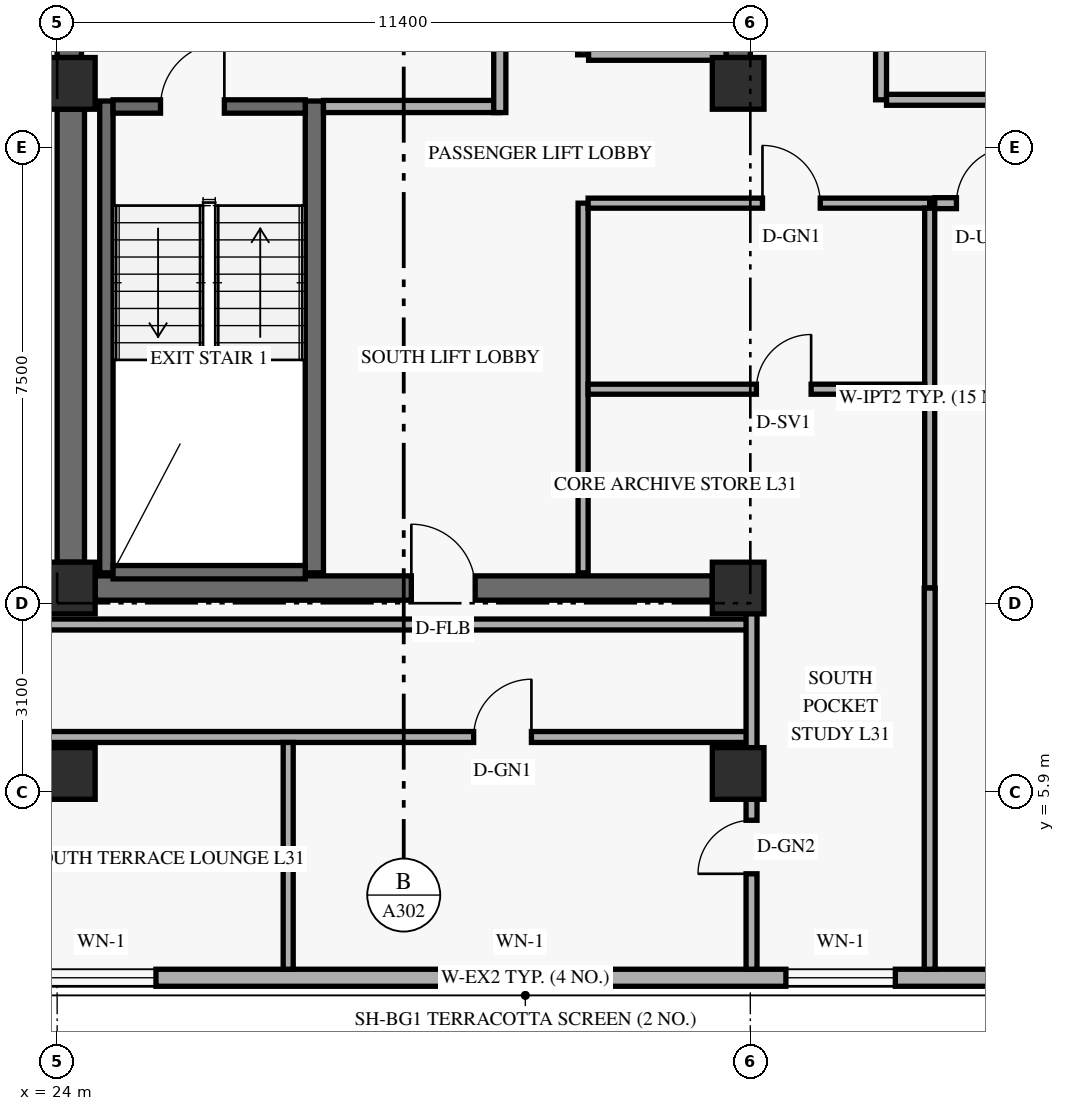
"""IFC4 building model, lengths in metres.
Left out: names, types, materials, properties, quantities, classifications, styles, units other than length and angle.
Written with IfcOpenShell. Run it as: python <this file> out.ifc"""

import sys

from ifc_helpers import new_model, si_unit, direction, frame, frame_2d, origin, origin_2d, place, context, subcontext, project, spatial, rectangle, extrude, element, fill, save


model = new_model("IFC4")
c1 = context("Model", 3, precision=1e-05, world=origin(), true_north=direction((0.0, 1.0)))
c2 = subcontext(c1, "Body", "Model", "MODEL_VIEW")
j1 = project(units=[si_unit("LENGTHUNIT", "METRE"), si_unit("PLANEANGLEUNIT", "RADIAN")], contexts=[c1])
p1 = place(None, origin())
s1 = spatial("IfcSite", under=j1, at=p1, CompositionType="ELEMENT")
p2 = place(p1, origin())
s2 = spatial("IfcBuilding", under=s1, at=p2, CompositionType="ELEMENT")
p3 = place(p2, frame((0.0, 0.0, 121.2)))
s3 = spatial("IfcBuildingStorey", under=s2, at=p3, CompositionType="ELEMENT", Elevation=121.2)
p4 = place(p3, frame((24.225, 9.675, 0.0), z_axis=(0.0, 0.0, 1.0), x_axis=(0.0, 1.0, 0.0)))
e1 = element("IfcWall", 1, at=p4, inside=s3, PredefinedType="SHEAR", context=c2, shape_type="SweptSolid", body=[
    extrude(rectangle(XDim=7.45, YDim=0.45, at=frame_2d((3.725, 0.0))), origin(), (0.0, 0.0, 1.0), 2.749),
])
p5 = place(p3, frame((24.2, 17.975, 0.0), z_axis=(0.0, 0.0, 1.0), x_axis=(0.0, 1.0, 0.0)))
e2 = element("IfcWall", 2, at=p5, inside=s3, PredefinedType="SHEAR", context=c2, shape_type="SweptSolid", body=[
    extrude(rectangle(XDim=11.8, YDim=0.4, at=frame_2d((5.9, 0.0))), origin(), (0.0, 0.0, 1.0), 2.749),
])
p6 = place(p3, frame((35.2, 17.975, 0.0), z_axis=(0.0, 0.0, 1.0), x_axis=(0.0, 1.0, 0.0)))
e3 = element("IfcWall", 3, at=p6, inside=s3, PredefinedType="SHEAR", context=c2, shape_type="SweptSolid", body=[
    extrude(rectangle(XDim=10.125, YDim=0.4, at=frame_2d((5.062, 0.0))), origin(), (0.0, 0.0, 1.0), 2.749),
])
p7 = place(p3, frame((24.625, 9.25, 0.0), z_axis=(0.0, 0.0, 1.0), x_axis=(1.0, 0.0, 0.0)))
e4 = element("IfcWall", 4, at=p7, inside=s3, PredefinedType="SHEAR", context=c2, shape_type="SweptSolid", body=[
    extrude(rectangle(XDim=10.15, YDim=0.4, at=frame_2d((5.075, 0.0))), origin(), (0.0, 0.0, 1.0), 3.36),
])
p8 = place(p7, frame((5.2, 0.0, 0.0)))
e5 = element("IfcOpeningElement", 5, at=p8, cuts=e4, PredefinedType="OPENING", context=c2, shape_type="SweptSolid", body=[
    extrude(rectangle(XDim=1.05, YDim=2.15, at=frame_2d((0.525, 1.075))), frame((0.0, 0.21, 0.0), z_axis=(0.0, -1.0, 0.0), x_axis=(1.0, 0.0, 0.0)), (0.0, 0.0, 1.0), 0.42),
])
p9 = place(p3, frame((24.81, 9.5, 0.0), z_axis=(0.0, 0.0, 1.0), x_axis=(0.0, 1.0, 0.0)))
e6 = element("IfcWall", 6, at=p9, inside=s3, PredefinedType="SHEAR", context=c2, shape_type="SweptSolid", body=[
    extrude(rectangle(XDim=7.76, YDim=0.22, at=frame_2d((3.88, 0.0))), origin(), (0.0, 0.0, 1.0), 3.36),
])
p10 = place(p3, frame((28.23, 9.5, 0.0), z_axis=(0.0, 0.0, 1.0), x_axis=(0.0, 1.0, 0.0)))
e7 = element("IfcWall", 7, at=p10, inside=s3, PredefinedType="SHEAR", context=c2, shape_type="SweptSolid", body=[
    extrude(rectangle(XDim=7.76, YDim=0.3, at=frame_2d((3.88, 0.0))), origin(), (0.0, 0.0, 1.0), 3.36),
])
p11 = place(p3, frame((24.92, 9.51, 0.0), z_axis=(0.0, 0.0, 1.0), x_axis=(1.0, 0.0, 0.0)))
e8 = element("IfcWall", 8, at=p11, inside=s3, PredefinedType="SHEAR", context=c2, shape_type="SweptSolid", body=[
    extrude(rectangle(XDim=3.16, YDim=0.22, at=frame_2d((1.58, 0.0))), origin(), (0.0, 0.0, 1.0), 3.36),
])
p12 = place(p3, frame((24.92, 17.17, 0.0), z_axis=(0.0, 0.0, 1.0), x_axis=(1.0, 0.0, 0.0)))
e9 = element("IfcWall", 9, at=p12, inside=s3, PredefinedType="SHEAR", context=c2, shape_type="SweptSolid", body=[
    extrude(rectangle(XDim=3.16, YDim=0.22, at=frame_2d((1.58, 0.0))), origin(), (0.0, 0.0, 1.0), 3.36),
])
p13 = place(p12, frame((0.78, 0.0, 0.0)))
e10 = element("IfcOpeningElement", 10, at=p13, cuts=e9, PredefinedType="OPENING", context=c2, shape_type="SweptSolid", body=[
    extrude(rectangle(XDim=1.05, YDim=2.15, at=frame_2d((0.525, 1.075))), frame((0.0, 0.12, 0.0), z_axis=(0.0, -1.0, 0.0), x_axis=(1.0, 0.0, 0.0)), (0.0, 0.0, 1.0), 0.24),
])
for number, where, z_axis, x_axis in (
    (11, (24.2, 6.2, 0.0), (0.0, 0.0, 1.0), (1.0, 0.0, 0.0)),
    (12, (24.2, 9.25, 0.0), (0.0, 0.0, 1.0), (1.0, 0.0, 0.0)),
    (13, (24.2, 17.55, 0.0), (0.0, 0.0, 1.0), (1.0, 0.0, 0.0)),
    (14, (35.2, 6.2, 0.0), (0.0, 0.0, 1.0), (1.0, 0.0, 0.0)),
    (15, (35.2, 9.25, 0.0), (0.0, 0.0, 1.0), (1.0, 0.0, 0.0)),
    (16, (35.2, 17.55, 0.0), (0.0, 0.0, 1.0), (1.0, 0.0, 0.0)),
):
    element("IfcColumn", number, at=place(p3, frame(where, z_axis=z_axis, x_axis=x_axis)), inside=s3, PredefinedType="COLUMN", context=c2, shape_type="SweptSolid", body=[
        extrude(rectangle(XDim=0.85, YDim=0.85, at=origin_2d()), origin(), (0.0, 0.0, 1.0), 3.6),
    ])
p14 = place(p3, frame((13.42, 2.84, 0.0), z_axis=(0.0, 0.0, 1.0), x_axis=(1.0, 0.0, 0.0)))
e17 = element("IfcWall", 17, at=p14, inside=s3, PredefinedType="SOLIDWALL", context=c2, shape_type="SweptSolid", body=[
    extrude(rectangle(XDim=36.56, YDim=0.28, at=frame_2d((18.28, 0.0))), origin(), (0.0, 0.0, 1.0), 3.36),
])
p15 = place(p14, frame((3.215, 0.0, 0.85)))
e18 = element("IfcOpeningElement", 18, at=p15, cuts=e17, PredefinedType="OPENING", context=c2, shape_type="SweptSolid", body=[
    extrude(rectangle(XDim=1.8, YDim=1.6, at=frame_2d((0.9, 0.8))), frame((0.0, 0.15, 0.0), z_axis=(0.0, -1.0, 0.0), x_axis=(1.0, 0.0, 0.0)), (0.0, 0.0, 1.0), 0.3),
])
p16 = place(p14, frame((10.405, 0.0, 0.85)))
e19 = element("IfcOpeningElement", 19, at=p16, cuts=e17, PredefinedType="OPENING", context=c2, shape_type="SweptSolid", body=[
    extrude(rectangle(XDim=1.8, YDim=1.6, at=frame_2d((0.9, 0.8))), frame((0.0, 0.15, 0.0), z_axis=(0.0, -1.0, 0.0), x_axis=(1.0, 0.0, 0.0)), (0.0, 0.0, 1.0), 0.3),
])
p17 = place(p14, frame((17.29, 0.0, 0.85)))
e20 = element("IfcOpeningElement", 20, at=p17, cuts=e17, PredefinedType="OPENING", context=c2, shape_type="SweptSolid", body=[
    extrude(rectangle(XDim=1.8, YDim=1.6, at=frame_2d((0.9, 0.8))), frame((0.0, 0.15, 0.0), z_axis=(0.0, -1.0, 0.0), x_axis=(1.0, 0.0, 0.0)), (0.0, 0.0, 1.0), 0.3),
])
p18 = place(p14, frame((22.565, 0.0, 0.85)))
e21 = element("IfcOpeningElement", 21, at=p18, cuts=e17, PredefinedType="OPENING", context=c2, shape_type="SweptSolid", body=[
    extrude(rectangle(XDim=1.8, YDim=1.6, at=frame_2d((0.9, 0.8))), frame((0.0, 0.15, 0.0), z_axis=(0.0, -1.0, 0.0), x_axis=(1.0, 0.0, 0.0)), (0.0, 0.0, 1.0), 0.3),
])
p19 = place(p14, frame((28.355, 0.0, 0.85)))
e22 = element("IfcOpeningElement", 22, at=p19, cuts=e17, PredefinedType="OPENING", context=c2, shape_type="SweptSolid", body=[
    extrude(rectangle(XDim=1.8, YDim=1.6, at=frame_2d((0.9, 0.8))), frame((0.0, 0.15, 0.0), z_axis=(0.0, -1.0, 0.0), x_axis=(1.0, 0.0, 0.0)), (0.0, 0.0, 1.0), 0.3),
])
p20 = place(p14, frame((34.17, 0.0, 0.85)))
e23 = element("IfcOpeningElement", 23, at=p20, cuts=e17, PredefinedType="OPENING", context=c2, shape_type="SweptSolid", body=[
    extrude(rectangle(XDim=1.8, YDim=1.6, at=frame_2d((0.9, 0.8))), frame((0.0, 0.15, 0.0), z_axis=(0.0, -1.0, 0.0), x_axis=(1.0, 0.0, 0.0)), (0.0, 0.0, 1.0), 0.3),
])
p21 = place(p3, frame((28.38, 17.17, 0.0), z_axis=(0.0, 0.0, 1.0), x_axis=(1.0, 0.0, 0.0)))
e24 = element("IfcWall", 24, at=p21, inside=s3, PredefinedType="STANDARD", context=c2, shape_type="SweptSolid", body=[
    extrude(rectangle(XDim=2.9, YDim=0.2, at=frame_2d((1.45, 0.0))), origin(), (0.0, 0.0, 1.0), 3.36),
])
p22 = place(p3, frame((31.28, 17.07, 0.0), z_axis=(0.0, 0.0, 1.0), x_axis=(0.0, 1.0, 0.0)))
e25 = element("IfcWall", 25, at=p22, inside=s3, PredefinedType="STANDARD", context=c2, shape_type="SweptSolid", body=[
    extrude(rectangle(XDim=3.92, YDim=0.2, at=frame_2d((1.96, 0.0))), origin(), (0.0, 0.0, 1.0), 2.731),
])
p23 = place(p22, frame((1.35, 0.0, 0.0)))
e26 = element("IfcOpeningElement", 26, at=p23, cuts=e25, PredefinedType="OPENING", context=c2, shape_type="SweptSolid", body=[
    extrude(rectangle(XDim=1.2, YDim=2.15, at=frame_2d((0.6, 1.075))), frame((0.0, 0.11, 0.0), z_axis=(0.0, -1.0, 0.0), x_axis=(1.0, 0.0, 0.0)), (0.0, 0.0, 1.0), 0.22),
])
p24 = place(p3, frame((32.65, 18.02, 0.0), z_axis=(0.0, 0.0, 1.0), x_axis=(0.0, 1.0, 0.0)))
e27 = element("IfcWall", 27, at=p24, inside=s3, PredefinedType="STANDARD", context=c2, shape_type="SweptSolid", body=[
    extrude(rectangle(XDim=10.06, YDim=0.18, at=frame_2d((5.03, 0.0))), origin(), (0.0, 0.0, 1.0), 3.36),
])
p25 = place(p3, frame((32.74, 18.02, 0.0), z_axis=(0.0, 0.0, 1.0), x_axis=(1.0, 0.0, 0.0)))
e28 = element("IfcWall", 28, at=p25, inside=s3, PredefinedType="STANDARD", context=c2, shape_type="SweptSolid", body=[
    extrude(rectangle(XDim=2.26, YDim=0.18, at=frame_2d((1.13, 0.0))), origin(), (0.0, 0.0, 1.0), 3.36),
])
p26 = place(p3, frame((32.65, 9.5, 0.0), z_axis=(0.0, 0.0, 1.0), x_axis=(0.0, 1.0, 0.0)))
e29 = element("IfcWall", 29, at=p26, inside=s3, PredefinedType="PARTITIONING", context=c2, shape_type="SweptSolid", body=[
    extrude(rectangle(XDim=6.08, YDim=0.165, at=frame_2d((3.04, 0.0))), origin(), (0.0, 0.0, 1.0), 3.36),
])
p27 = place(p3, frame((32.732, 15.58, 0.0), z_axis=(0.0, 0.0, 1.0), x_axis=(1.0, 0.0, 0.0)))
e30 = element("IfcWall", 30, at=p27, inside=s3, PredefinedType="PARTITIONING", context=c2, shape_type="SweptSolid", body=[
    extrude(rectangle(XDim=5.618, YDim=0.165, at=frame_2d((2.809, 0.0))), origin(), (0.0, 0.0, 1.0), 2.731),
])
p28 = place(p27, frame((2.867, 0.0, 0.0)))
e31 = element("IfcOpeningElement", 31, at=p28, cuts=e30, PredefinedType="OPENING", context=c2, shape_type="SweptSolid", body=[
    extrude(rectangle(XDim=0.95, YDim=2.15, at=frame_2d((0.475, 1.075))), frame((0.0, 0.093, 0.0), z_axis=(0.0, -1.0, 0.0), x_axis=(1.0, 0.0, 0.0)), (0.0, 0.0, 1.0), 0.185),
])
p29 = place(p3, frame((38.35, 9.25, 0.0), z_axis=(0.0, 0.0, 1.0), x_axis=(0.0, 1.0, 0.0)))
e32 = element("IfcWall", 32, at=p29, inside=s3, PredefinedType="PARTITIONING", context=c2, shape_type="SweptSolid", body=[
    extrude(rectangle(XDim=6.248, YDim=0.165, at=frame_2d((3.124, 0.0))), origin(), (0.0, 0.0, 1.0), 2.731),
])
p30 = place(p3, frame((32.732, 12.52, 0.0), z_axis=(0.0, 0.0, 1.0), x_axis=(1.0, 0.0, 0.0)))
e33 = element("IfcWall", 33, at=p30, inside=s3, PredefinedType="PARTITIONING", context=c2, shape_type="SweptSolid", body=[
    extrude(rectangle(XDim=5.535, YDim=0.165, at=frame_2d((2.768, 0.0))), origin(), (0.0, 0.0, 1.0), 2.731),
])
p31 = place(p30, frame((2.768, 0.0, 0.0)))
e34 = element("IfcOpeningElement", 34, at=p31, cuts=e33, PredefinedType="OPENING", context=c2, shape_type="SweptSolid", body=[
    extrude(rectangle(XDim=0.9, YDim=2.1, at=frame_2d((0.45, 1.05))), frame((0.0, 0.093, 0.0), z_axis=(0.0, -1.0, 0.0), x_axis=(1.0, 0.0, 0.0)), (0.0, 0.0, 1.0), 0.185),
])
p32 = place(p3, frame((37.55, 17.28, 0.0), z_axis=(0.0, 0.0, 1.0), x_axis=(0.0, 1.0, 0.0)))
e35 = element("IfcWall", 35, at=p32, inside=s3, PredefinedType="STANDARD", context=c2, shape_type="SweptSolid", body=[
    extrude(rectangle(XDim=10.28, YDim=0.18, at=frame_2d((5.14, 0.0))), origin(), (0.0, 0.0, 1.0), 2.731),
])
p33 = place(p32, frame((1.94, 0.0, 0.0)))
e36 = element("IfcOpeningElement", 36, at=p33, cuts=e35, PredefinedType="OPENING", context=c2, shape_type="SweptSolid", body=[
    extrude(rectangle(XDim=0.95, YDim=2.15, at=frame_2d((0.475, 1.075))), frame((0.0, 0.1, 0.0), z_axis=(0.0, -1.0, 0.0), x_axis=(1.0, 0.0, 0.0)), (0.0, 0.0, 1.0), 0.2),
])
p34 = place(p32, frame((6.99, 0.0, 0.0)))
e37 = element("IfcOpeningElement", 37, at=p34, cuts=e35, PredefinedType="OPENING", context=c2, shape_type="SweptSolid", body=[
    extrude(rectangle(XDim=0.95, YDim=2.15, at=frame_2d((0.475, 1.075))), frame((0.0, 0.1, 0.0), z_axis=(0.0, -1.0, 0.0), x_axis=(1.0, 0.0, 0.0)), (0.0, 0.0, 1.0), 0.2),
])
p35 = place(p3, frame((38.433, 15.58, 0.0), z_axis=(0.0, 0.0, 1.0), x_axis=(1.0, 0.0, 0.0)))
e38 = element("IfcWall", 38, at=p35, inside=s3, PredefinedType="STANDARD", context=c2, shape_type="SweptSolid", body=[
    extrude(rectangle(XDim=8.567, YDim=0.18, at=frame_2d((4.284, 0.0))), origin(), (0.0, 0.0, 1.0), 2.731),
])
p36 = place(p35, frame((0.357, 0.0, 0.0)))
e39 = element("IfcOpeningElement", 39, at=p36, cuts=e38, PredefinedType="OPENING", context=c2, shape_type="SweptSolid", body=[
    extrude(rectangle(XDim=0.92, YDim=2.15, at=frame_2d((0.46, 1.075))), frame((0.0, 0.1, 0.0), z_axis=(0.0, -1.0, 0.0), x_axis=(1.0, 0.0, 0.0)), (0.0, 0.0, 1.0), 0.2),
])
p37 = place(p3, frame((37.64, 17.28, 0.0), z_axis=(0.0, 0.0, 1.0), x_axis=(1.0, 0.0, 0.0)))
e40 = element("IfcWall", 40, at=p37, inside=s3, PredefinedType="STANDARD", context=c2, shape_type="SweptSolid", body=[
    extrude(rectangle(XDim=9.36, YDim=0.18, at=frame_2d((4.68, 0.0))), origin(), (0.0, 0.0, 1.0), 2.731),
])
p38 = place(p37, frame((7.238, 0.0, 0.0)))
e41 = element("IfcOpeningElement", 41, at=p38, cuts=e40, PredefinedType="OPENING", context=c2, shape_type="SweptSolid", body=[
    extrude(rectangle(XDim=0.92, YDim=2.15, at=frame_2d((0.46, 1.075))), frame((0.0, 0.1, 0.0), z_axis=(0.0, -1.0, 0.0), x_axis=(1.0, 0.0, 0.0)), (0.0, 0.0, 1.0), 0.2),
])
p39 = place(p3, frame((21.74, 6.8, 0.0), z_axis=(0.0, 0.0, 1.0), x_axis=(1.0, 0.0, 0.0)))
e42 = element("IfcWall", 42, at=p39, inside=s3, PredefinedType="STANDARD", context=c2, shape_type="SweptSolid", body=[
    extrude(rectangle(XDim=13.68, YDim=0.18, at=frame_2d((6.84, 0.0))), origin(), (0.0, 0.0, 1.0), 2.731),
])
p40 = place(p39, frame((0.97, 0.0, 0.0)))
e43 = element("IfcOpeningElement", 43, at=p40, cuts=e42, PredefinedType="OPENING", context=c2, shape_type="SweptSolid", body=[
    extrude(rectangle(XDim=0.95, YDim=2.15, at=frame_2d((0.475, 1.075))), frame((0.0, 0.1, 0.0), z_axis=(0.0, -1.0, 0.0), x_axis=(1.0, 0.0, 0.0)), (0.0, 0.0, 1.0), 0.2),
])
p41 = place(p39, frame((9.11, 0.0, 0.0)))
e44 = element("IfcOpeningElement", 44, at=p41, cuts=e42, PredefinedType="OPENING", context=c2, shape_type="SweptSolid", body=[
    extrude(rectangle(XDim=0.95, YDim=2.15, at=frame_2d((0.475, 1.075))), frame((0.0, 0.1, 0.0), z_axis=(0.0, -1.0, 0.0), x_axis=(1.0, 0.0, 0.0)), (0.0, 0.0, 1.0), 0.2),
])
p42 = place(p3, frame((23.85, 8.65, 0.0), z_axis=(0.0, 0.0, 1.0), x_axis=(1.0, 0.0, 0.0)))
e45 = element("IfcWall", 45, at=p42, inside=s3, PredefinedType="STANDARD", context=c2, shape_type="SweptSolid", body=[
    extrude(rectangle(XDim=11.57, YDim=0.18, at=frame_2d((5.785, 0.0))), origin(), (0.0, 0.0, 1.0), 2.731),
])
p43 = place(p3, frame((35.42, 2.98, 0.0), z_axis=(0.0, 0.0, 1.0), x_axis=(0.0, 1.0, 0.0)))
e46 = element("IfcWall", 46, at=p43, inside=s3, PredefinedType="PARTITIONING", context=c2, shape_type="SweptSolid", body=[
    extrude(rectangle(XDim=6.27, YDim=0.18, at=frame_2d((3.135, 0.0))), origin(), (0.0, 0.0, 1.0), 2.731),
])
p44 = place(p43, frame((1.57, 0.0, 0.0)))
e47 = element("IfcOpeningElement", 47, at=p44, cuts=e46, PredefinedType="OPENING", context=c2, shape_type="SweptSolid", body=[
    extrude(rectangle(XDim=0.88, YDim=2.12, at=frame_2d((0.44, 1.06))), frame((0.0, 0.1, 0.0), z_axis=(0.0, -1.0, 0.0), x_axis=(1.0, 0.0, 0.0)), (0.0, 0.0, 1.0), 0.2),
])
p45 = place(p3, frame((38.35, 2.98, 0.0), z_axis=(0.0, 0.0, 1.0), x_axis=(0.0, 1.0, 0.0)))
e48 = element("IfcWall", 48, at=p45, inside=s3, PredefinedType="PARTITIONING", context=c2, shape_type="SweptSolid", body=[
    extrude(rectangle(XDim=6.27, YDim=0.18, at=frame_2d((3.135, 0.0))), origin(), (0.0, 0.0, 1.0), 2.731),
])
p46 = place(p3, frame((27.8, 2.98, 0.0), z_axis=(0.0, 0.0, 1.0), x_axis=(0.0, 1.0, 0.0)))
e49 = element("IfcWall", 49, at=p46, inside=s3, PredefinedType="PARTITIONING", context=c2, shape_type="SweptSolid", body=[
    extrude(rectangle(XDim=3.73, YDim=0.165, at=frame_2d((1.865, 0.0))), origin(), (0.0, 0.0, 1.0), 2.809),
])
p47 = place(p16, origin())
e50 = element("IfcWindow", 50, at=p47, inside=s3, PartitioningType="SINGLE_PANEL", PredefinedType="WINDOW", context=c2, shape_type="SweptSolid", body=[
    extrude(rectangle(XDim=1.8, YDim=1.6, at=frame_2d((0.9, 0.8))), frame((0.0, 0.03, 0.0), z_axis=(0.0, -1.0, 0.0), x_axis=(1.0, 0.0, 0.0)), (0.0, 0.0, 1.0), 0.06),
])
fill(e19, e50)
p48 = place(p17, origin())
e51 = element("IfcWindow", 51, at=p48, inside=s3, PartitioningType="SINGLE_PANEL", PredefinedType="WINDOW", context=c2, shape_type="SweptSolid", body=[
    extrude(rectangle(XDim=1.8, YDim=1.6, at=frame_2d((0.9, 0.8))), frame((0.0, 0.03, 0.0), z_axis=(0.0, -1.0, 0.0), x_axis=(1.0, 0.0, 0.0)), (0.0, 0.0, 1.0), 0.06),
])
fill(e20, e51)
p49 = place(p18, origin())
e52 = element("IfcWindow", 52, at=p49, inside=s3, PartitioningType="SINGLE_PANEL", PredefinedType="WINDOW", context=c2, shape_type="SweptSolid", body=[
    extrude(rectangle(XDim=1.8, YDim=1.6, at=frame_2d((0.9, 0.8))), frame((0.0, 0.03, 0.0), z_axis=(0.0, -1.0, 0.0), x_axis=(1.0, 0.0, 0.0)), (0.0, 0.0, 1.0), 0.06),
])
fill(e21, e52)
p50 = place(p13, frame((1.05, 0.0, 0.0), z_axis=(0.0, 0.0, 1.0), x_axis=(-1.0, 0.0, 0.0)))
e53 = element("IfcDoor", 53, at=p50, inside=s3, OperationType="SINGLE_SWING_LEFT", PredefinedType="DOOR", context=c2, shape_type="SweptSolid", body=[
    extrude(rectangle(XDim=1.05, YDim=2.15, at=frame_2d((0.525, 1.075))), frame((0.0, 0.025, 0.0), z_axis=(0.0, -1.0, 0.0), x_axis=(1.0, 0.0, 0.0)), (0.0, 0.0, 1.0), 0.05),
])
fill(e10, e53)
p51 = place(p28, origin())
e54 = element("IfcDoor", 54, at=p51, inside=s3, OperationType="SINGLE_SWING_LEFT", PredefinedType="DOOR", context=c2, shape_type="SweptSolid", body=[
    extrude(rectangle(XDim=0.95, YDim=2.15, at=frame_2d((0.475, 1.075))), frame((0.0, 0.025, 0.0), z_axis=(0.0, -1.0, 0.0), x_axis=(1.0, 0.0, 0.0)), (0.0, 0.0, 1.0), 0.05),
])
fill(e31, e54)
p52 = place(p31, origin())
e55 = element("IfcDoor", 55, at=p52, inside=s3, OperationType="SINGLE_SWING_RIGHT", PredefinedType="DOOR", context=c2, shape_type="SweptSolid", body=[
    extrude(rectangle(XDim=0.9, YDim=2.1, at=frame_2d((0.45, 1.05))), frame((0.0, 0.025, 0.0), z_axis=(0.0, -1.0, 0.0), x_axis=(1.0, 0.0, 0.0)), (0.0, 0.0, 1.0), 0.05),
])
fill(e34, e55)
p53 = place(p8, origin())
e56 = element("IfcDoor", 56, at=p53, inside=s3, OperationType="SINGLE_SWING_LEFT", PredefinedType="DOOR", context=c2, shape_type="SweptSolid", body=[
    extrude(rectangle(XDim=1.05, YDim=2.15, at=frame_2d((0.525, 1.075))), frame((0.0, 0.025, 0.0), z_axis=(0.0, -1.0, 0.0), x_axis=(1.0, 0.0, 0.0)), (0.0, 0.0, 1.0), 0.05),
])
fill(e5, e56)
p54 = place(p44, origin())
e57 = element("IfcDoor", 57, at=p54, inside=s3, OperationType="SINGLE_SWING_LEFT", PredefinedType="DOOR", context=c2, shape_type="SweptSolid", body=[
    extrude(rectangle(XDim=0.88, YDim=2.12, at=frame_2d((0.44, 1.06))), frame((0.0, 0.025, 0.0), z_axis=(0.0, -1.0, 0.0), x_axis=(1.0, 0.0, 0.0)), (0.0, 0.0, 1.0), 0.05),
])
fill(e47, e57)
p55 = place(p36, origin())
e58 = element("IfcDoor", 58, at=p55, inside=s3, OperationType="SINGLE_SWING_RIGHT", PredefinedType="DOOR", context=c2, shape_type="SweptSolid", body=[
    extrude(rectangle(XDim=0.92, YDim=2.15, at=frame_2d((0.46, 1.075))), frame((0.0, 0.025, 0.0), z_axis=(0.0, -1.0, 0.0), x_axis=(1.0, 0.0, 0.0)), (0.0, 0.0, 1.0), 0.05),
])
fill(e39, e58)
p56 = place(p41, origin())
e59 = element("IfcDoor", 59, at=p56, inside=s3, OperationType="SINGLE_SWING_RIGHT", PredefinedType="DOOR", context=c2, shape_type="SweptSolid", body=[
    extrude(rectangle(XDim=0.95, YDim=2.15, at=frame_2d((0.475, 1.075))), frame((0.0, 0.025, 0.0), z_axis=(0.0, -1.0, 0.0), x_axis=(1.0, 0.0, 0.0)), (0.0, 0.0, 1.0), 0.05),
])
fill(e44, e59)
save(model, sys.argv[1])
